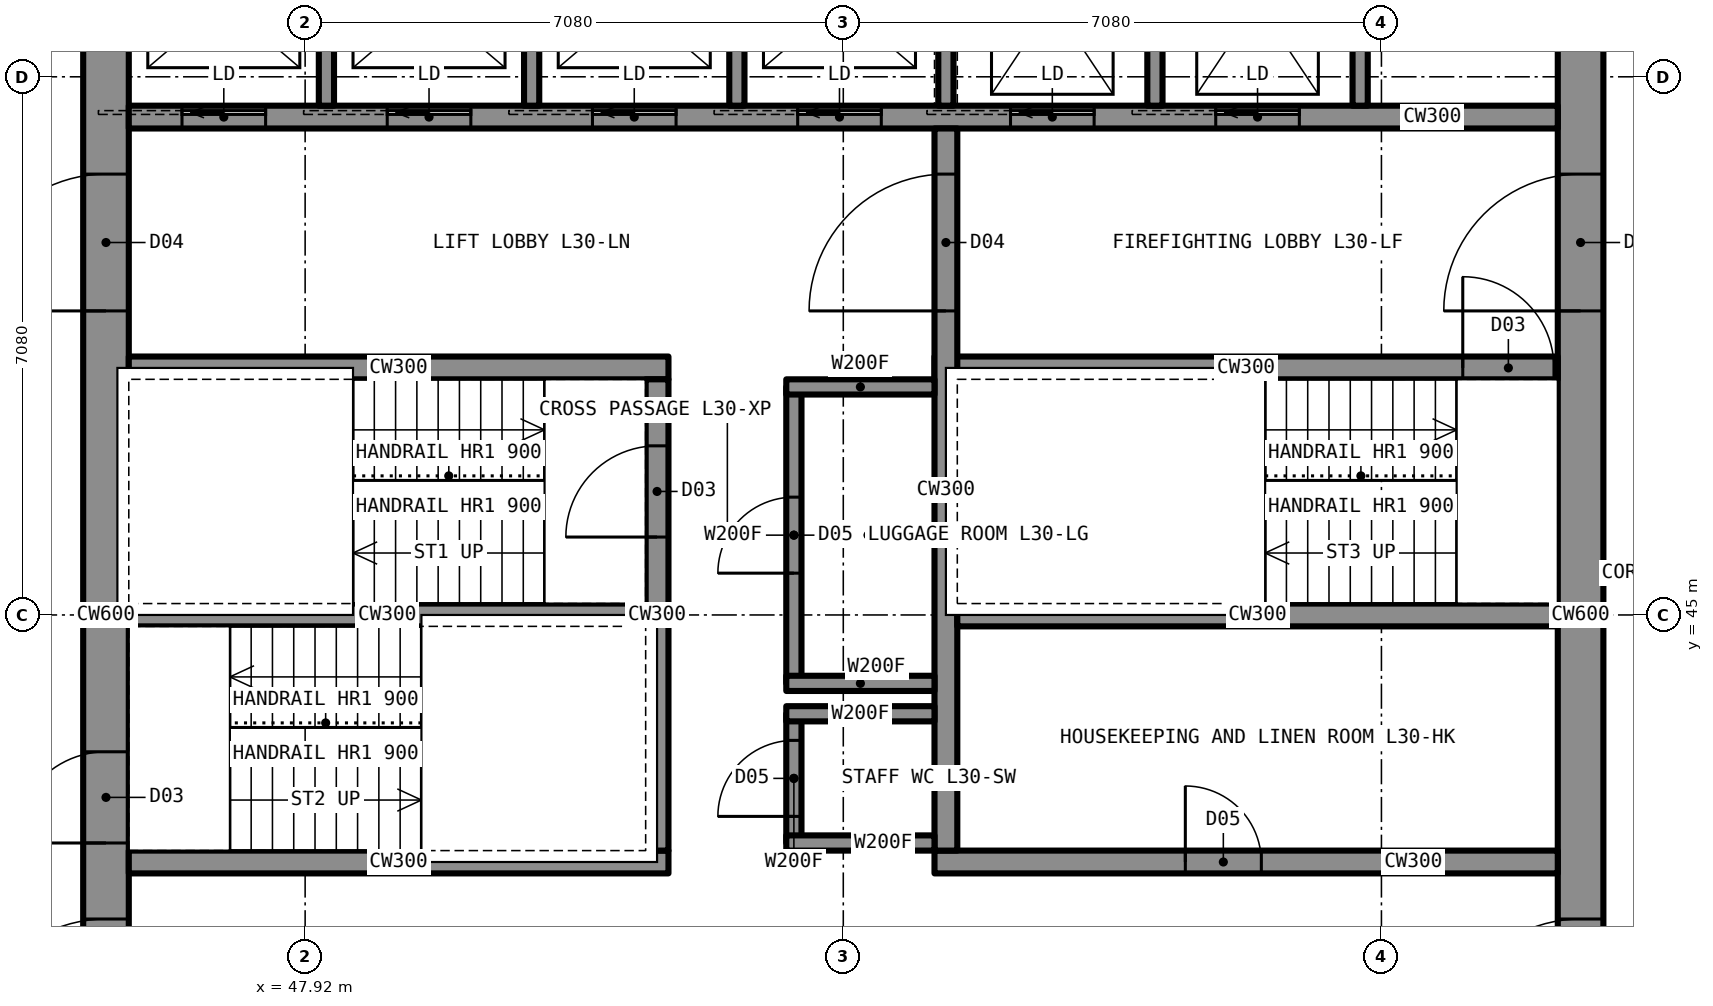
"""IFC4 building model, lengths in metres.
Left out: names, types, materials, properties, quantities, classifications, styles, units other than length and angle.
Written with IfcOpenShell. Run it as: python <this file> out.ifc"""

import sys

from ifc_helpers import new_model, si_unit, direction, frame, frame_2d, origin, place, context, subcontext, project, spatial, rectangle, extrude, element, fill, save


model = new_model("IFC4")
c1 = context("Model", 3, precision=1e-05, world=origin(), true_north=direction((0.0, 1.0)))
c2 = subcontext(c1, "Body", "Model", "MODEL_VIEW")
j1 = project(units=[si_unit("LENGTHUNIT", "METRE"), si_unit("PLANEANGLEUNIT", "RADIAN")], contexts=[c1])
p1 = place(None, origin())
s1 = spatial("IfcSite", under=j1, at=p1, CompositionType="ELEMENT")
p2 = place(p1, origin())
s2 = spatial("IfcBuilding", under=s1, at=p2, CompositionType="ELEMENT")
p3 = place(p2, frame((0.0, 0.0, 114.4)))
s3 = spatial("IfcBuildingStorey", under=s2, at=p3, CompositionType="ELEMENT", Elevation=114.4)
p4 = place(p3, frame((64.7, 35.6, 0.0), z_axis=(0.0, 0.0, 1.0), x_axis=(0.0, 1.0, 0.0)))
e1 = element("IfcWall", 1, at=p4, inside=s3, PredefinedType="SHEAR", context=c2, shape_type="SweptSolid", body=[
    extrude(rectangle(XDim=18.8, YDim=0.6, at=frame_2d((9.4, 0.0))), origin(), (0.0, 0.0, 1.0), 3.5),
])
p5 = place(p4, frame((13.4, 0.0, 0.0)))
e2 = element("IfcOpeningElement", 2, at=p5, cuts=e1, PredefinedType="OPENING", context=c2, shape_type="SweptSolid", body=[
    extrude(rectangle(XDim=1.8, YDim=2.2, at=frame_2d((0.9, 1.1))), frame((0.0, 0.31, 0.0), z_axis=(0.0, -1.0, 0.0), x_axis=(1.0, 0.0, 0.0)), (0.0, 0.0, 1.0), 0.62),
])
p6 = place(p4, frame((3.6, 0.0, 0.0)))
e3 = element("IfcOpeningElement", 3, at=p6, cuts=e1, PredefinedType="OPENING", context=c2, shape_type="SweptSolid", body=[
    extrude(rectangle(XDim=1.8, YDim=2.2, at=frame_2d((0.9, 1.1))), frame((0.0, 0.31, 0.0), z_axis=(0.0, -1.0, 0.0), x_axis=(1.0, 0.0, 0.0)), (0.0, 0.0, 1.0), 0.62),
])
p7 = place(p3, frame((45.3, 35.6, 0.0), z_axis=(0.0, 0.0, 1.0), x_axis=(0.0, 1.0, 0.0)))
e4 = element("IfcWall", 4, at=p7, inside=s3, PredefinedType="SHEAR", context=c2, shape_type="SweptSolid", body=[
    extrude(rectangle(XDim=18.8, YDim=0.6, at=frame_2d((9.4, 0.0))), origin(), (0.0, 0.0, 1.0), 3.5),
])
p8 = place(p7, frame((13.4, 0.0, 0.0)))
e5 = element("IfcOpeningElement", 5, at=p8, cuts=e4, PredefinedType="OPENING", context=c2, shape_type="SweptSolid", body=[
    extrude(rectangle(XDim=1.8, YDim=2.2, at=frame_2d((0.9, 1.1))), frame((0.0, 0.31, 0.0), z_axis=(0.0, -1.0, 0.0), x_axis=(1.0, 0.0, 0.0)), (0.0, 0.0, 1.0), 0.62),
])
p9 = place(p7, frame((3.6, 0.0, 0.0)))
e6 = element("IfcOpeningElement", 6, at=p9, cuts=e4, PredefinedType="OPENING", context=c2, shape_type="SweptSolid", body=[
    extrude(rectangle(XDim=1.8, YDim=2.2, at=frame_2d((0.9, 1.1))), frame((0.0, 0.31, 0.0), z_axis=(0.0, -1.0, 0.0), x_axis=(1.0, 0.0, 0.0)), (0.0, 0.0, 1.0), 0.62),
])
p10 = place(p7, frame((6.4, 0.0, 0.0)))
e7 = element("IfcOpeningElement", 7, at=p10, cuts=e4, PredefinedType="OPENING", context=c2, shape_type="SweptSolid", body=[
    extrude(rectangle(XDim=1.2, YDim=2.2, at=frame_2d((0.6, 1.1))), frame((0.0, 0.31, 0.0), z_axis=(0.0, -1.0, 0.0), x_axis=(1.0, 0.0, 0.0)), (0.0, 0.0, 1.0), 0.62),
])
p11 = place(p3, frame((45.6, 51.55, 0.0), z_axis=(0.0, 0.0, 1.0), x_axis=(1.0, 0.0, 0.0)))
e8 = element("IfcWall", 8, at=p11, inside=s3, PredefinedType="SHEAR", context=c2, shape_type="SweptSolid", body=[
    extrude(rectangle(XDim=18.8, YDim=0.3, at=frame_2d((9.4, 0.0))), origin(), (0.0, 0.0, 1.0), 3.5),
])
p12 = place(p11, frame((0.7, 0.0, 0.0)))
e9 = element("IfcOpeningElement", 9, at=p12, cuts=e8, PredefinedType="OPENING", context=c2, shape_type="SweptSolid", body=[
    extrude(rectangle(XDim=1.1, YDim=2.2, at=frame_2d((0.55, 1.1))), frame((0.0, 0.16, 0.0), z_axis=(0.0, -1.0, 0.0), x_axis=(1.0, 0.0, 0.0)), (0.0, 0.0, 1.0), 0.32),
])
p13 = place(p11, frame((3.4, 0.0, 0.0)))
e10 = element("IfcOpeningElement", 10, at=p13, cuts=e8, PredefinedType="OPENING", context=c2, shape_type="SweptSolid", body=[
    extrude(rectangle(XDim=1.1, YDim=2.2, at=frame_2d((0.55, 1.1))), frame((0.0, 0.16, 0.0), z_axis=(0.0, -1.0, 0.0), x_axis=(1.0, 0.0, 0.0)), (0.0, 0.0, 1.0), 0.32),
])
p14 = place(p11, frame((6.1, 0.0, 0.0)))
e11 = element("IfcOpeningElement", 11, at=p14, cuts=e8, PredefinedType="OPENING", context=c2, shape_type="SweptSolid", body=[
    extrude(rectangle(XDim=1.1, YDim=2.2, at=frame_2d((0.55, 1.1))), frame((0.0, 0.16, 0.0), z_axis=(0.0, -1.0, 0.0), x_axis=(1.0, 0.0, 0.0)), (0.0, 0.0, 1.0), 0.32),
])
p15 = place(p11, frame((8.8, 0.0, 0.0)))
e12 = element("IfcOpeningElement", 12, at=p15, cuts=e8, PredefinedType="OPENING", context=c2, shape_type="SweptSolid", body=[
    extrude(rectangle(XDim=1.1, YDim=2.2, at=frame_2d((0.55, 1.1))), frame((0.0, 0.16, 0.0), z_axis=(0.0, -1.0, 0.0), x_axis=(1.0, 0.0, 0.0)), (0.0, 0.0, 1.0), 0.32),
])
p16 = place(p11, frame((11.6, 0.0, 0.0)))
e13 = element("IfcOpeningElement", 13, at=p16, cuts=e8, PredefinedType="OPENING", context=c2, shape_type="SweptSolid", body=[
    extrude(rectangle(XDim=1.1, YDim=2.2, at=frame_2d((0.55, 1.1))), frame((0.0, 0.16, 0.0), z_axis=(0.0, -1.0, 0.0), x_axis=(1.0, 0.0, 0.0)), (0.0, 0.0, 1.0), 0.32),
])
p17 = place(p11, frame((14.3, 0.0, 0.0)))
e14 = element("IfcOpeningElement", 14, at=p17, cuts=e8, PredefinedType="OPENING", context=c2, shape_type="SweptSolid", body=[
    extrude(rectangle(XDim=1.1, YDim=2.2, at=frame_2d((0.55, 1.1))), frame((0.0, 0.16, 0.0), z_axis=(0.0, -1.0, 0.0), x_axis=(1.0, 0.0, 0.0)), (0.0, 0.0, 1.0), 0.32),
])
p18 = place(p3, frame((45.6, 48.25, 0.0), z_axis=(0.0, 0.0, 1.0), x_axis=(1.0, 0.0, 0.0)))
e15 = element("IfcWall", 15, at=p18, inside=s3, PredefinedType="SHEAR", context=c2, shape_type="SweptSolid", body=[
    extrude(rectangle(XDim=7.1, YDim=0.3, at=frame_2d((3.55, 0.0))), origin(), (0.0, 0.0, 1.0), 3.5),
])
p19 = place(p3, frame((56.2, 48.25, 0.0), z_axis=(0.0, 0.0, 1.0), x_axis=(1.0, 0.0, 0.0)))
e16 = element("IfcWall", 16, at=p19, inside=s3, PredefinedType="SHEAR", context=c2, shape_type="SweptSolid", body=[
    extrude(rectangle(XDim=8.2, YDim=0.3, at=frame_2d((4.1, 0.0))), origin(), (0.0, 0.0, 1.0), 3.5),
])
p20 = place(p19, frame((6.95, 0.0, 0.0)))
e17 = element("IfcOpeningElement", 17, at=p20, cuts=e16, PredefinedType="OPENING", context=c2, shape_type="SweptSolid", body=[
    extrude(rectangle(XDim=1.2, YDim=2.2, at=frame_2d((0.6, 1.1))), frame((0.0, 0.16, 0.0), z_axis=(0.0, -1.0, 0.0), x_axis=(1.0, 0.0, 0.0)), (0.0, 0.0, 1.0), 0.32),
])
p21 = place(p3, frame((45.6, 41.75, 0.0), z_axis=(0.0, 0.0, 1.0), x_axis=(1.0, 0.0, 0.0)))
e18 = element("IfcWall", 18, at=p21, inside=s3, PredefinedType="SHEAR", context=c2, shape_type="SweptSolid", body=[
    extrude(rectangle(XDim=7.1, YDim=0.3, at=frame_2d((3.55, 0.0))), origin(), (0.0, 0.0, 1.0), 3.5),
])
p22 = place(p3, frame((56.2, 41.75, 0.0), z_axis=(0.0, 0.0, 1.0), x_axis=(1.0, 0.0, 0.0)))
e19 = element("IfcWall", 19, at=p22, inside=s3, PredefinedType="SHEAR", context=c2, shape_type="SweptSolid", body=[
    extrude(rectangle(XDim=8.2, YDim=0.3, at=frame_2d((4.1, 0.0))), origin(), (0.0, 0.0, 1.0), 3.5),
])
p23 = place(p22, frame((3.3, 0.0, 0.0)))
e20 = element("IfcOpeningElement", 20, at=p23, cuts=e19, PredefinedType="OPENING", context=c2, shape_type="SweptSolid", body=[
    extrude(rectangle(XDim=1.0, YDim=2.1, at=frame_2d((0.5, 1.05))), frame((0.0, 0.16, 0.0), z_axis=(0.0, -1.0, 0.0), x_axis=(1.0, 0.0, 0.0)), (0.0, 0.0, 1.0), 0.32),
])
p24 = place(p3, frame((52.55, 41.9, 0.0), z_axis=(0.0, 0.0, 1.0), x_axis=(0.0, 1.0, 0.0)))
e21 = element("IfcWall", 21, at=p24, inside=s3, PredefinedType="SHEAR", context=c2, shape_type="SweptSolid", body=[
    extrude(rectangle(XDim=6.2, YDim=0.3, at=frame_2d((3.1, 0.0))), origin(), (0.0, 0.0, 1.0), 3.5),
])
p25 = place(p24, frame((4.125, 0.0, 0.0)))
e22 = element("IfcOpeningElement", 22, at=p25, cuts=e21, PredefinedType="OPENING", context=c2, shape_type="SweptSolid", body=[
    extrude(rectangle(XDim=1.2, YDim=2.2, at=frame_2d((0.6, 1.1))), frame((0.0, 0.16, 0.0), z_axis=(0.0, -1.0, 0.0), x_axis=(1.0, 0.0, 0.0)), (0.0, 0.0, 1.0), 0.32),
])
p26 = place(p3, frame((56.35, 41.9, 0.0), z_axis=(0.0, 0.0, 1.0), x_axis=(0.0, 1.0, 0.0)))
e23 = element("IfcWall", 23, at=p26, inside=s3, PredefinedType="SHEAR", context=c2, shape_type="SweptSolid", body=[
    extrude(rectangle(XDim=9.5, YDim=0.3, at=frame_2d((4.75, 0.0))), origin(), (0.0, 0.0, 1.0), 3.5),
])
p27 = place(p26, frame((7.1, 0.0, 0.0)))
e24 = element("IfcOpeningElement", 24, at=p27, cuts=e23, PredefinedType="OPENING", context=c2, shape_type="SweptSolid", body=[
    extrude(rectangle(XDim=1.8, YDim=2.2, at=frame_2d((0.9, 1.1))), frame((0.0, 0.16, 0.0), z_axis=(0.0, -1.0, 0.0), x_axis=(1.0, 0.0, 0.0)), (0.0, 0.0, 1.0), 0.32),
])
p28 = place(p3, frame((45.6, 45.0, 0.0), z_axis=(0.0, 0.0, 1.0), x_axis=(1.0, 0.0, 0.0)))
e25 = element("IfcWall", 25, at=p28, inside=s3, PredefinedType="SHEAR", context=c2, shape_type="SweptSolid", body=[
    extrude(rectangle(XDim=6.8, YDim=0.3, at=frame_2d((3.4, 0.0))), origin(), (0.0, 0.0, 1.0), 3.5),
])
p29 = place(p3, frame((56.5, 45.0, 0.0), z_axis=(0.0, 0.0, 1.0), x_axis=(1.0, 0.0, 0.0)))
e26 = element("IfcWall", 26, at=p29, inside=s3, PredefinedType="SHEAR", context=c2, shape_type="SweptSolid", body=[
    extrude(rectangle(XDim=7.9, YDim=0.3, at=frame_2d((3.95, 0.0))), origin(), (0.0, 0.0, 1.0), 3.5),
])
p30 = place(p3, frame((54.35, 42.0, 0.0), z_axis=(0.0, 0.0, 1.0), x_axis=(0.0, 1.0, 0.0)))
e27 = element("IfcWall", 27, at=p30, inside=s3, PredefinedType="PARTITIONING", context=c2, shape_type="SweptSolid", body=[
    extrude(rectangle(XDim=1.7, YDim=0.2, at=frame_2d((0.85, 0.0))), origin(), (0.0, 0.0, 1.0), 3.33),
])
p31 = place(p30, frame((0.35, 0.0, 0.0)))
e28 = element("IfcOpeningElement", 28, at=p31, cuts=e27, PredefinedType="OPENING", context=c2, shape_type="SweptSolid", body=[
    extrude(rectangle(XDim=1.0, YDim=2.1, at=frame_2d((0.5, 1.05))), frame((0.0, 0.11, 0.0), z_axis=(0.0, -1.0, 0.0), x_axis=(1.0, 0.0, 0.0)), (0.0, 0.0, 1.0), 0.22),
])
for number, where, z_axis, x_axis in (
    (29, (54.25, 42.0, 0.0), (0.0, 0.0, 1.0), (1.0, 0.0, 0.0)),
    (30, (54.25, 43.7, 0.0), (0.0, 0.0, 1.0), (1.0, 0.0, 0.0)),
):
    element("IfcWall", number, at=place(p3, frame(where, z_axis=z_axis, x_axis=x_axis)), inside=s3, PredefinedType="PARTITIONING", context=c2, shape_type="SweptSolid", body=[
        extrude(rectangle(XDim=1.95, YDim=0.2, at=frame_2d((0.975, 0.0))), origin(), (0.0, 0.0, 1.0), 3.33),
    ])
p32 = place(p3, frame((54.35, 44.1, 0.0), z_axis=(0.0, 0.0, 1.0), x_axis=(0.0, 1.0, 0.0)))
e31 = element("IfcWall", 31, at=p32, inside=s3, PredefinedType="PARTITIONING", context=c2, shape_type="SweptSolid", body=[
    extrude(rectangle(XDim=3.9, YDim=0.2, at=frame_2d((1.95, 0.0))), origin(), (0.0, 0.0, 1.0), 3.33),
])
p33 = place(p32, frame((1.45, 0.0, 0.0)))
e32 = element("IfcOpeningElement", 32, at=p33, cuts=e31, PredefinedType="OPENING", context=c2, shape_type="SweptSolid", body=[
    extrude(rectangle(XDim=1.0, YDim=2.1, at=frame_2d((0.5, 1.05))), frame((0.0, 0.11, 0.0), z_axis=(0.0, -1.0, 0.0), x_axis=(1.0, 0.0, 0.0)), (0.0, 0.0, 1.0), 0.22),
])
for number, where, z_axis, x_axis in (
    (33, (54.25, 44.1, 0.0), (0.0, 0.0, 1.0), (1.0, 0.0, 0.0)),
    (34, (54.25, 48.0, 0.0), (0.0, 0.0, 1.0), (1.0, 0.0, 0.0)),
):
    element("IfcWall", number, at=place(p3, frame(where, z_axis=z_axis, x_axis=x_axis)), inside=s3, PredefinedType="PARTITIONING", context=c2, shape_type="SweptSolid", body=[
        extrude(rectangle(XDim=1.95, YDim=0.2, at=frame_2d((0.975, 0.0))), origin(), (0.0, 0.0, 1.0), 3.33),
    ])
for number, where, z_axis, x_axis in (
    (35, (48.2, 51.7, 0.0), (0.0, 0.0, 1.0), (0.0, 1.0, 0.0)),
    (36, (50.9, 51.7, 0.0), (0.0, 0.0, 1.0), (0.0, 1.0, 0.0)),
    (37, (53.6, 51.7, 0.0), (0.0, 0.0, 1.0), (0.0, 1.0, 0.0)),
    (38, (59.1, 51.7, 0.0), (0.0, 0.0, 1.0), (0.0, 1.0, 0.0)),
    (39, (61.8, 51.7, 0.0), (0.0, 0.0, 1.0), (0.0, 1.0, 0.0)),
    (40, (56.35, 51.7, 0.0), (0.0, 0.0, 1.0), (0.0, 1.0, 0.0)),
):
    element("IfcWall", number, at=place(p3, frame(where, z_axis=z_axis, x_axis=x_axis)), inside=s3, PredefinedType="PARTITIONING", context=c2, shape_type="SweptSolid", body=[
        extrude(rectangle(XDim=2.7, YDim=0.2, at=frame_2d((1.35, 0.0))), origin(), (0.0, 0.0, 1.0), 3.33),
    ])
p34 = place(p31, origin())
e41 = element("IfcDoor", 41, at=p34, inside=s3, OperationType="SINGLE_SWING_LEFT", PredefinedType="DOOR", context=c2, shape_type="SweptSolid", body=[
    extrude(rectangle(XDim=1.0, YDim=2.1, at=frame_2d((0.5, 1.05))), frame((0.0, 0.025, 0.0), z_axis=(0.0, -1.0, 0.0), x_axis=(1.0, 0.0, 0.0)), (0.0, 0.0, 1.0), 0.05),
])
fill(e28, e41)
p35 = place(p33, origin())
e42 = element("IfcDoor", 42, at=p35, inside=s3, OperationType="SINGLE_SWING_LEFT", PredefinedType="DOOR", context=c2, shape_type="SweptSolid", body=[
    extrude(rectangle(XDim=1.0, YDim=2.1, at=frame_2d((0.5, 1.05))), frame((0.0, 0.025, 0.0), z_axis=(0.0, -1.0, 0.0), x_axis=(1.0, 0.0, 0.0)), (0.0, 0.0, 1.0), 0.05),
])
fill(e32, e42)
p36 = place(p8, origin())
e43 = element("IfcDoor", 43, at=p36, inside=s3, OperationType="DOUBLE_DOOR_SINGLE_SWING", PredefinedType="DOOR", context=c2, shape_type="SweptSolid", body=[
    extrude(rectangle(XDim=1.8, YDim=2.2, at=frame_2d((0.9, 1.1))), frame((0.0, 0.025, 0.0), z_axis=(0.0, -1.0, 0.0), x_axis=(1.0, 0.0, 0.0)), (0.0, 0.0, 1.0), 0.05),
])
fill(e5, e43)
p37 = place(p9, origin())
e44 = element("IfcDoor", 44, at=p37, inside=s3, OperationType="DOUBLE_DOOR_SINGLE_SWING", PredefinedType="DOOR", context=c2, shape_type="SweptSolid", body=[
    extrude(rectangle(XDim=1.8, YDim=2.2, at=frame_2d((0.9, 1.1))), frame((0.0, 0.025, 0.0), z_axis=(0.0, -1.0, 0.0), x_axis=(1.0, 0.0, 0.0)), (0.0, 0.0, 1.0), 0.05),
])
fill(e6, e44)
p38 = place(p5, origin())
e45 = element("IfcDoor", 45, at=p38, inside=s3, OperationType="DOUBLE_DOOR_SINGLE_SWING", PredefinedType="DOOR", context=c2, shape_type="SweptSolid", body=[
    extrude(rectangle(XDim=1.8, YDim=2.2, at=frame_2d((0.9, 1.1))), frame((0.0, 0.025, 0.0), z_axis=(0.0, -1.0, 0.0), x_axis=(1.0, 0.0, 0.0)), (0.0, 0.0, 1.0), 0.05),
])
fill(e2, e45)
p39 = place(p6, origin())
e46 = element("IfcDoor", 46, at=p39, inside=s3, OperationType="DOUBLE_DOOR_SINGLE_SWING", PredefinedType="DOOR", context=c2, shape_type="SweptSolid", body=[
    extrude(rectangle(XDim=1.8, YDim=2.2, at=frame_2d((0.9, 1.1))), frame((0.0, 0.025, 0.0), z_axis=(0.0, -1.0, 0.0), x_axis=(1.0, 0.0, 0.0)), (0.0, 0.0, 1.0), 0.05),
])
fill(e3, e46)
p40 = place(p27, origin())
e47 = element("IfcDoor", 47, at=p40, inside=s3, OperationType="DOUBLE_DOOR_SINGLE_SWING", PredefinedType="DOOR", context=c2, shape_type="SweptSolid", body=[
    extrude(rectangle(XDim=1.8, YDim=2.2, at=frame_2d((0.9, 1.1))), frame((0.0, 0.025, 0.0), z_axis=(0.0, -1.0, 0.0), x_axis=(1.0, 0.0, 0.0)), (0.0, 0.0, 1.0), 0.05),
])
fill(e24, e47)
p41 = place(p25, origin())
e48 = element("IfcDoor", 48, at=p41, inside=s3, OperationType="SINGLE_SWING_LEFT", PredefinedType="DOOR", context=c2, shape_type="SweptSolid", body=[
    extrude(rectangle(XDim=1.2, YDim=2.2, at=frame_2d((0.6, 1.1))), frame((0.0, 0.025, 0.0), z_axis=(0.0, -1.0, 0.0), x_axis=(1.0, 0.0, 0.0)), (0.0, 0.0, 1.0), 0.05),
])
fill(e22, e48)
p42 = place(p10, origin())
e49 = element("IfcDoor", 49, at=p42, inside=s3, OperationType="SINGLE_SWING_LEFT", PredefinedType="DOOR", context=c2, shape_type="SweptSolid", body=[
    extrude(rectangle(XDim=1.2, YDim=2.2, at=frame_2d((0.6, 1.1))), frame((0.0, 0.025, 0.0), z_axis=(0.0, -1.0, 0.0), x_axis=(1.0, 0.0, 0.0)), (0.0, 0.0, 1.0), 0.05),
])
fill(e7, e49)
p43 = place(p20, origin())
e50 = element("IfcDoor", 50, at=p43, inside=s3, OperationType="SINGLE_SWING_LEFT", PredefinedType="DOOR", context=c2, shape_type="SweptSolid", body=[
    extrude(rectangle(XDim=1.2, YDim=2.2, at=frame_2d((0.6, 1.1))), frame((0.0, 0.025, 0.0), z_axis=(0.0, -1.0, 0.0), x_axis=(1.0, 0.0, 0.0)), (0.0, 0.0, 1.0), 0.05),
])
fill(e17, e50)
p44 = place(p23, origin())
e51 = element("IfcDoor", 51, at=p44, inside=s3, OperationType="SINGLE_SWING_LEFT", PredefinedType="DOOR", context=c2, shape_type="SweptSolid", body=[
    extrude(rectangle(XDim=1.0, YDim=2.1, at=frame_2d((0.5, 1.05))), frame((0.0, 0.025, 0.0), z_axis=(0.0, -1.0, 0.0), x_axis=(1.0, 0.0, 0.0)), (0.0, 0.0, 1.0), 0.05),
])
fill(e20, e51)
p45 = place(p12, origin())
e52 = element("IfcDoor", 52, at=p45, inside=s3, OperationType="SLIDING_TO_LEFT", PredefinedType="DOOR", context=c2, shape_type="SweptSolid", body=[
    extrude(rectangle(XDim=1.1, YDim=2.2, at=frame_2d((0.55, 1.1))), frame((0.0, 0.025, 0.0), z_axis=(0.0, -1.0, 0.0), x_axis=(1.0, 0.0, 0.0)), (0.0, 0.0, 1.0), 0.05),
])
fill(e9, e52)
p46 = place(p13, origin())
e53 = element("IfcDoor", 53, at=p46, inside=s3, OperationType="SLIDING_TO_LEFT", PredefinedType="DOOR", context=c2, shape_type="SweptSolid", body=[
    extrude(rectangle(XDim=1.1, YDim=2.2, at=frame_2d((0.55, 1.1))), frame((0.0, 0.025, 0.0), z_axis=(0.0, -1.0, 0.0), x_axis=(1.0, 0.0, 0.0)), (0.0, 0.0, 1.0), 0.05),
])
fill(e10, e53)
p47 = place(p14, origin())
e54 = element("IfcDoor", 54, at=p47, inside=s3, OperationType="SLIDING_TO_LEFT", PredefinedType="DOOR", context=c2, shape_type="SweptSolid", body=[
    extrude(rectangle(XDim=1.1, YDim=2.2, at=frame_2d((0.55, 1.1))), frame((0.0, 0.025, 0.0), z_axis=(0.0, -1.0, 0.0), x_axis=(1.0, 0.0, 0.0)), (0.0, 0.0, 1.0), 0.05),
])
fill(e11, e54)
p48 = place(p15, origin())
e55 = element("IfcDoor", 55, at=p48, inside=s3, OperationType="SLIDING_TO_LEFT", PredefinedType="DOOR", context=c2, shape_type="SweptSolid", body=[
    extrude(rectangle(XDim=1.1, YDim=2.2, at=frame_2d((0.55, 1.1))), frame((0.0, 0.025, 0.0), z_axis=(0.0, -1.0, 0.0), x_axis=(1.0, 0.0, 0.0)), (0.0, 0.0, 1.0), 0.05),
])
fill(e12, e55)
p49 = place(p16, origin())
e56 = element("IfcDoor", 56, at=p49, inside=s3, OperationType="SLIDING_TO_LEFT", PredefinedType="DOOR", context=c2, shape_type="SweptSolid", body=[
    extrude(rectangle(XDim=1.1, YDim=2.2, at=frame_2d((0.55, 1.1))), frame((0.0, 0.025, 0.0), z_axis=(0.0, -1.0, 0.0), x_axis=(1.0, 0.0, 0.0)), (0.0, 0.0, 1.0), 0.05),
])
fill(e13, e56)
p50 = place(p17, origin())
e57 = element("IfcDoor", 57, at=p50, inside=s3, OperationType="SLIDING_TO_LEFT", PredefinedType="DOOR", context=c2, shape_type="SweptSolid", body=[
    extrude(rectangle(XDim=1.1, YDim=2.2, at=frame_2d((0.55, 1.1))), frame((0.0, 0.025, 0.0), z_axis=(0.0, -1.0, 0.0), x_axis=(1.0, 0.0, 0.0)), (0.0, 0.0, 1.0), 0.05),
])
fill(e14, e57)
save(model, sys.argv[1])
